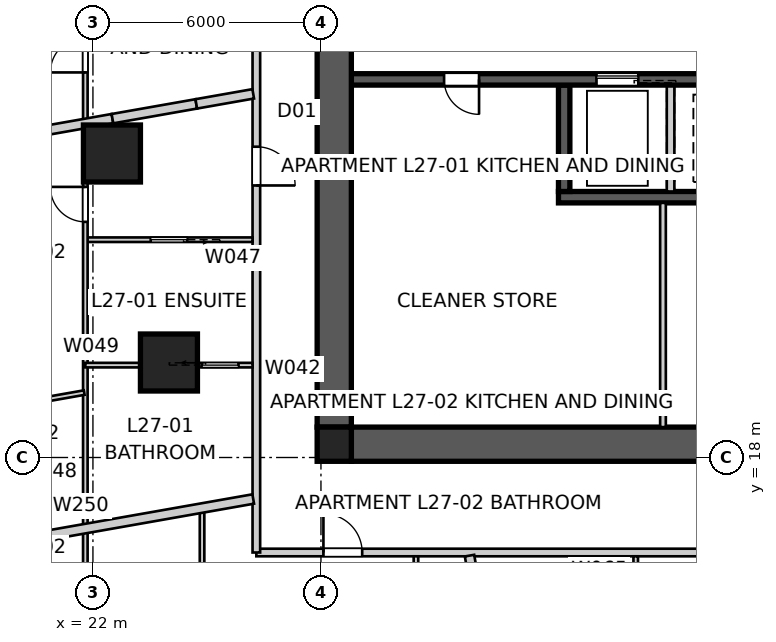
"""IFC4 building model, lengths in metres.
Left out: names, types, materials, properties, quantities, classifications, styles, units other than length and angle.
Written with IfcOpenShell. Run it as: python <this file> out.ifc"""

import sys

from ifc_helpers import new_model, si_unit, direction, frame, frame_2d, origin, origin_2d, place, context, subcontext, project, spatial, polyline, rectangle, outline, extrude, element, fill, save


model = new_model("IFC4")
c1 = context("Model", 3, precision=1e-05, world=origin(), true_north=direction((0.0, 1.0)))
c2 = subcontext(c1, "Body", "Model", "MODEL_VIEW")
j1 = project(units=[si_unit("LENGTHUNIT", "METRE"), si_unit("PLANEANGLEUNIT", "RADIAN")], contexts=[c1])
p1 = place(None, origin())
s1 = spatial("IfcSite", under=j1, at=p1, CompositionType="ELEMENT")
p2 = place(p1, origin())
s2 = spatial("IfcBuilding", under=s1, at=p2, CompositionType="ELEMENT")
p3 = place(p2, frame((0.0, 0.0, 99.8)))
s3 = spatial("IfcBuildingStorey", under=s2, at=p3, CompositionType="ELEMENT", Elevation=99.8)
p4 = place(p3, frame((51.2, 18.35, 0.0), z_axis=(0.0, 0.0, 1.0), x_axis=(-1.0, 0.0, 0.0)))
e1 = element("IfcWall", 1, at=p4, inside=s3, PredefinedType="SHEAR", context=c2, shape_type="SweptSolid", body=[
    extrude(outline(polyline([(0.0, -0.45), (22.4, -0.45), (22.4, -0.025), (22.85, -0.025), (22.85, 0.025), (22.4, 0.025), (22.4, 0.45), (0.0, 0.45), (0.0, 0.025), (-0.45, 0.025), (-0.45, -0.025), (0.0, -0.025), (0.0, -0.45)])), origin(), (0.0, 0.0, 1.0), 3.4),
])
p5 = place(p3, frame((28.35, 41.2, 0.0), z_axis=(0.0, 0.0, 1.0), x_axis=(0.0, -1.0, 0.0)))
e2 = element("IfcWall", 2, at=p5, inside=s3, PredefinedType="SHEAR", context=c2, shape_type="SweptSolid", body=[
    extrude(outline(polyline([(0.0, -0.45), (22.4, -0.45), (22.4, -0.025), (22.85, -0.025), (22.85, 0.025), (22.4, 0.025), (22.4, 0.45), (0.0, 0.45), (0.0, 0.025), (-0.45, 0.025), (-0.45, -0.025), (0.0, -0.025), (0.0, -0.45)])), origin(), (0.0, 0.0, 1.0), 3.4),
])
p6 = place(p5, frame((11.14, 0.0, 0.0)))
e3 = element("IfcOpeningElement", 3, at=p6, cuts=e2, PredefinedType="OPENING", context=c2, shape_type="SweptSolid", body=[
    extrude(rectangle(XDim=1.02, YDim=2.4, at=frame_2d((0.51, 1.2))), frame((0.0, 0.46, 0.0), z_axis=(0.0, -1.0, 0.0), x_axis=(1.0, 0.0, 0.0)), (0.0, 0.0, 1.0), 0.92),
])
p7 = place(p3, frame((51.2, 27.95, 0.0), z_axis=(0.0, 0.0, 1.0), x_axis=(-1.0, 0.0, 0.0)))
e4 = element("IfcWall", 4, at=p7, inside=s3, PredefinedType="SHEAR", context=c2, shape_type="SweptSolid", body=[
    extrude(rectangle(XDim=22.4, YDim=0.3, at=frame_2d((11.2, 0.0))), origin(), (0.0, 0.0, 1.0), 3.4),
])
p8 = place(p7, frame((19.04, 0.0, 0.0)))
e5 = element("IfcOpeningElement", 5, at=p8, cuts=e4, PredefinedType="OPENING", context=c2, shape_type="SweptSolid", body=[
    extrude(rectangle(XDim=0.92, YDim=2.1, at=frame_2d((0.46, 1.05))), frame((0.0, 0.16, 0.0), z_axis=(0.0, -1.0, 0.0), x_axis=(1.0, 0.0, 0.0)), (0.0, 0.0, 1.0), 0.32),
])
p9 = place(p7, frame((1.265, 0.0, 0.0)))
e6 = element("IfcOpeningElement", 6, at=p9, cuts=e4, PredefinedType="OPENING", context=c2, shape_type="SweptSolid", body=[
    extrude(rectangle(XDim=1.02, YDim=2.1, at=frame_2d((0.51, 1.05))), frame((0.0, 0.16, 0.0), z_axis=(0.0, -1.0, 0.0), x_axis=(1.0, 0.0, 0.0)), (0.0, 0.0, 1.0), 0.32),
])
p10 = place(p7, frame((4.015, 0.0, 0.0)))
e7 = element("IfcOpeningElement", 7, at=p10, cuts=e4, PredefinedType="OPENING", context=c2, shape_type="SweptSolid", body=[
    extrude(rectangle(XDim=0.92, YDim=2.1, at=frame_2d((0.46, 1.05))), frame((0.0, 0.16, 0.0), z_axis=(0.0, -1.0, 0.0), x_axis=(1.0, 0.0, 0.0)), (0.0, 0.0, 1.0), 0.32),
])
p11 = place(p7, frame((14.85, 0.0, 0.0)))
e8 = element("IfcOpeningElement", 8, at=p11, cuts=e4, PredefinedType="OPENING", context=c2, shape_type="SweptSolid", body=[
    extrude(rectangle(XDim=1.1, YDim=2.1, at=frame_2d((0.55, 1.05))), frame((0.0, 0.16, 0.0), z_axis=(0.0, -1.0, 0.0), x_axis=(1.0, 0.0, 0.0)), (0.0, 0.0, 1.0), 0.32),
])
p12 = place(p3, frame((45.75, 24.85, 0.0), z_axis=(0.0, 0.0, 1.0), x_axis=(-1.0, 0.0, 0.0)))
e9 = element("IfcWall", 9, at=p12, inside=s3, PredefinedType="SHEAR", context=c2, shape_type="SweptSolid", body=[
    extrude(rectangle(XDim=11.5, YDim=0.3, at=frame_2d((5.75, 0.0))), origin(), (0.0, 0.0, 1.0), 3.4),
])
p13 = place(p3, frame((37.2, 27.8, 0.0), z_axis=(0.0, 0.0, 1.0), x_axis=(0.0, -1.0, 0.0)))
e10 = element("IfcWall", 10, at=p13, inside=s3, PredefinedType="SOLIDWALL", context=c2, shape_type="SweptSolid", body=[
    extrude(rectangle(XDim=2.8, YDim=0.2, at=frame_2d((1.4, 0.0))), origin(), (0.0, 0.0, 1.0), 3.4),
])
p14 = place(p3, frame((34.4, 27.8, 0.0), z_axis=(0.0, 0.0, 1.0), x_axis=(0.0, -1.0, 0.0)))
e11 = element("IfcWall", 11, at=p14, inside=s3, PredefinedType="SHEAR", context=c2, shape_type="SweptSolid", body=[
    extrude(rectangle(XDim=2.8, YDim=0.3, at=frame_2d((1.4, 0.0))), origin(), (0.0, 0.0, 1.0), 3.4),
])
p15 = place(p3, frame((28.35, 18.35, 0.0), z_axis=(0.0, 0.0, 1.0), x_axis=(1.0, 0.0, 0.0)))
e12 = element("IfcColumn", 12, at=p15, inside=s3, PredefinedType="COLUMN", context=c2, shape_type="SweptSolid", body=[
    extrude(rectangle(XDim=0.9, YDim=0.9, at=origin_2d()), origin(), (0.0, 0.0, 1.0), 3.4),
])
for number, where, z_axis, x_axis in (
    (13, (22.5, 26.0, 0.0), (0.0, 0.0, 1.0), (1.0, 0.0, 0.0)),
    (14, (24.0, 20.5, 0.0), (0.0, 0.0, 1.0), (1.0, 0.0, 0.0)),
):
    element("IfcColumn", number, at=place(p3, frame(where, z_axis=z_axis, x_axis=x_axis)), inside=s3, PredefinedType="COLUMN", context=c2, shape_type="SweptSolid", body=[
        extrude(rectangle(XDim=1.5, YDim=1.5, at=origin_2d()), origin(), (0.0, 0.0, 1.0), 3.4),
    ])
p16 = place(p3, frame((26.3, 15.5, 0.0), z_axis=(0.0, 0.0, 1.0), x_axis=(1.0, 0.0, 0.0)))
e15 = element("IfcWall", 15, at=p16, inside=s3, PredefinedType="PARTITIONING", context=c2, shape_type="SweptSolid", body=[
    extrude(rectangle(XDim=27.4, YDim=0.2, at=frame_2d((13.7, 0.0))), origin(), (0.0, 0.0, 1.0), 3.25),
])
p17 = place(p16, frame((24.005, 0.0, 0.0)))
e16 = element("IfcOpeningElement", 16, at=p17, cuts=e15, PredefinedType="OPENING", context=c2, shape_type="SweptSolid", body=[
    extrude(rectangle(XDim=1.02, YDim=2.1, at=frame_2d((0.51, 1.05))), frame((0.0, 0.11, 0.0), z_axis=(0.0, -1.0, 0.0), x_axis=(1.0, 0.0, 0.0)), (0.0, 0.0, 1.0), 0.22),
])
p18 = place(p16, frame((1.765, 0.0, 0.0)))
e17 = element("IfcOpeningElement", 17, at=p18, cuts=e15, PredefinedType="OPENING", context=c2, shape_type="SweptSolid", body=[
    extrude(rectangle(XDim=1.02, YDim=2.1, at=frame_2d((0.51, 1.05))), frame((0.0, 0.11, 0.0), z_axis=(0.0, -1.0, 0.0), x_axis=(1.0, 0.0, 0.0)), (0.0, 0.0, 1.0), 0.22),
])
p19 = place(p3, frame((26.3, 44.5, 0.0), z_axis=(0.0, 0.0, 1.0), x_axis=(0.0, -1.0, 0.0)))
e18 = element("IfcWall", 18, at=p19, inside=s3, PredefinedType="PARTITIONING", context=c2, shape_type="SweptSolid", body=[
    extrude(rectangle(XDim=29.0, YDim=0.2, at=frame_2d((14.5, 0.0))), origin(), (0.0, 0.0, 1.0), 3.25),
])
p20 = place(p19, frame((14.257, 0.0, 0.0)))
e19 = element("IfcOpeningElement", 19, at=p20, cuts=e18, PredefinedType="OPENING", context=c2, shape_type="SweptSolid", body=[
    extrude(rectangle(XDim=1.02, YDim=2.34, at=frame_2d((0.51, 1.17))), frame((0.0, 0.11, 0.0), z_axis=(0.0, -1.0, 0.0), x_axis=(1.0, 0.0, 0.0)), (0.0, 0.0, 1.0), 0.22),
])
p21 = place(p19, frame((18.322, 0.0, 0.0)))
e20 = element("IfcOpeningElement", 20, at=p21, cuts=e18, PredefinedType="OPENING", context=c2, shape_type="SweptSolid", body=[
    extrude(rectangle(XDim=1.02, YDim=2.34, at=frame_2d((0.51, 1.17))), frame((0.0, 0.11, 0.0), z_axis=(0.0, -1.0, 0.0), x_axis=(1.0, 0.0, 0.0)), (0.0, 0.0, 1.0), 0.22),
])
p22 = place(p19, frame((3.963, 0.0, 0.0)))
e21 = element("IfcOpeningElement", 21, at=p22, cuts=e18, PredefinedType="OPENING", context=c2, shape_type="SweptSolid", body=[
    extrude(rectangle(XDim=1.02, YDim=2.34, at=frame_2d((0.51, 1.17))), frame((0.0, 0.11, 0.0), z_axis=(0.0, -1.0, 0.0), x_axis=(1.0, 0.0, 0.0)), (0.0, 0.0, 1.0), 0.22),
])
p23 = place(p3, frame((34.001, 3.556, 0.0), z_axis=(0.0, 0.0, 1.0), x_axis=(-0.173654664517, 0.984806609184, 0.0)))
e22 = element("IfcWall", 22, at=p23, inside=s3, PredefinedType="PARTITIONING", context=c2, shape_type="SweptSolid", body=[
    extrude(rectangle(XDim=12.044, YDim=0.25, at=frame_2d((6.022, 0.0))), origin(), (0.0, 0.0, 1.0), 3.25),
])
p24 = place(p3, frame((17.203, 15.318, 0.0), z_axis=(0.0, 0.0, 1.0), x_axis=(0.984810933893, 0.173630137029, 0.0)))
e23 = element("IfcWall", 23, at=p24, inside=s3, PredefinedType="PARTITIONING", context=c2, shape_type="SweptSolid", body=[
    extrude(rectangle(XDim=9.154, YDim=0.25, at=frame_2d((4.577, 0.0))), origin(), (0.0, 0.0, 1.0), 3.25),
])
p25 = place(p3, frame((15.38, 25.659, 0.0), z_axis=(0.0, 0.0, 1.0), x_axis=(0.984802553948, 0.173677660443, 0.0)))
e24 = element("IfcWall", 24, at=p25, inside=s3, PredefinedType="PARTITIONING", context=c2, shape_type="SweptSolid", body=[
    extrude(rectangle(XDim=7.244, YDim=0.25, at=frame_2d((3.622, 0.0))), origin(), (0.0, 0.0, 1.0), 3.25),
])
p26 = place(p3, frame((22.513, 26.917, 0.0), z_axis=(0.0, 0.0, 1.0), x_axis=(0.984809882944, 0.17363609779, 0.0)))
e25 = element("IfcWall", 25, at=p26, inside=s3, PredefinedType="PARTITIONING", context=c2, shape_type="SweptSolid", body=[
    extrude(rectangle(XDim=2.24, YDim=0.25, at=frame_2d((1.12, 0.0))), origin(), (0.0, 0.0, 1.0), 2.795),
])
p27 = place(p3, frame((24.719, 27.306, 0.0), z_axis=(0.0, 0.0, 1.0), x_axis=(0.984815846312, 0.173602272028, 0.0)))
e26 = element("IfcWall", 26, at=p27, inside=s3, PredefinedType="PARTITIONING", context=c2, shape_type="SweptSolid", body=[
    extrude(rectangle(XDim=1.522, YDim=0.25, at=frame_2d((0.761, 0.0))), origin(), (0.0, 0.0, 1.0), 3.25),
])
p28 = place(p3, frame((37.0, 18.8, 0.0), z_axis=(0.0, 0.0, 1.0), x_axis=(0.0, 1.0, 0.0)))
e27 = element("IfcWall", 27, at=p28, inside=s3, PredefinedType="SOLIDWALL", context=c2, shape_type="SweptSolid", body=[
    extrude(rectangle(XDim=5.9, YDim=0.15, at=frame_2d((2.95, 0.0))), origin(), (0.0, 0.0, 1.0), 3.25),
])
p29 = place(p3, frame((26.2, 23.731, 0.0), z_axis=(0.0, 0.0, 1.0), x_axis=(-1.0, 0.0, 0.0)))
e28 = element("IfcWall", 28, at=p29, inside=s3, PredefinedType="PARTITIONING", context=c2, shape_type="SweptSolid", body=[
    extrude(rectangle(XDim=4.4, YDim=0.12, at=frame_2d((2.2, 0.0))), origin(), (0.0, 0.0, 1.0), 3.25),
])
p30 = place(p29, frame((1.72, 0.0, 0.0)))
e29 = element("IfcOpeningElement", 29, at=p30, cuts=e28, PredefinedType="OPENING", context=c2, shape_type="SweptSolid", body=[
    extrude(rectangle(XDim=0.96, YDim=2.1, at=frame_2d((0.48, 1.05))), frame((0.0, 0.07, 0.0), z_axis=(0.0, -1.0, 0.0), x_axis=(1.0, 0.0, 0.0)), (0.0, 0.0, 1.0), 0.14),
])
p31 = place(p3, frame((21.8, 11.8, 0.0), z_axis=(0.0, 0.0, 1.0), x_axis=(0.0, 1.0, 0.0)))
e30 = element("IfcWall", 30, at=p31, inside=s3, PredefinedType="PARTITIONING", context=c2, shape_type="SweptSolid", body=[
    extrude(rectangle(XDim=25.653, YDim=0.12, at=frame_2d((12.826, 0.0))), origin(), (0.0, 0.0, 1.0), 3.25),
])
p32 = place(p31, frame((16.333, 0.0, 0.0)))
e31 = element("IfcOpeningElement", 31, at=p32, cuts=e30, PredefinedType="OPENING", context=c2, shape_type="SweptSolid", body=[
    extrude(rectangle(XDim=0.92, YDim=2.34, at=frame_2d((0.46, 1.17))), frame((0.0, 0.07, 0.0), z_axis=(0.0, -1.0, 0.0), x_axis=(1.0, 0.0, 0.0)), (0.0, 0.0, 1.0), 0.14),
])
p33 = place(p31, frame((18.821, 0.0, 0.0)))
e32 = element("IfcOpeningElement", 32, at=p33, cuts=e30, PredefinedType="OPENING", context=c2, shape_type="SweptSolid", body=[
    extrude(rectangle(XDim=0.92, YDim=2.34, at=frame_2d((0.46, 1.17))), frame((0.0, 0.07, 0.0), z_axis=(0.0, -1.0, 0.0), x_axis=(1.0, 0.0, 0.0)), (0.0, 0.0, 1.0), 0.14),
])
p34 = place(p31, frame((12.401, 0.0, 0.0)))
e33 = element("IfcOpeningElement", 33, at=p34, cuts=e30, PredefinedType="OPENING", context=c2, shape_type="SweptSolid", body=[
    extrude(rectangle(XDim=0.92, YDim=2.34, at=frame_2d((0.46, 1.17))), frame((0.0, 0.07, 0.0), z_axis=(0.0, -1.0, 0.0), x_axis=(1.0, 0.0, 0.0)), (0.0, 0.0, 1.0), 0.14),
])
p35 = place(p31, frame((2.066, 0.0, 0.0)))
e34 = element("IfcOpeningElement", 34, at=p35, cuts=e30, PredefinedType="OPENING", context=c2, shape_type="SweptSolid", body=[
    extrude(rectangle(XDim=0.92, YDim=2.34, at=frame_2d((0.46, 1.17))), frame((0.0, 0.07, 0.0), z_axis=(0.0, -1.0, 0.0), x_axis=(1.0, 0.0, 0.0)), (0.0, 0.0, 1.0), 0.14),
])
p36 = place(p31, frame((23.651, 0.0, 0.0)))
e35 = element("IfcOpeningElement", 35, at=p36, cuts=e30, PredefinedType="OPENING", context=c2, shape_type="SweptSolid", body=[
    extrude(rectangle(XDim=0.96, YDim=2.1, at=frame_2d((0.48, 1.05))), frame((0.0, 0.07, 0.0), z_axis=(0.0, -1.0, 0.0), x_axis=(1.0, 0.0, 0.0)), (0.0, 0.0, 1.0), 0.14),
])
p37 = place(p3, frame((21.8, 20.431, 0.0), z_axis=(0.0, 0.0, 1.0), x_axis=(1.0, 0.0, 0.0)))
e36 = element("IfcWall", 36, at=p37, inside=s3, PredefinedType="PARTITIONING", context=c2, shape_type="SweptSolid", body=[
    extrude(rectangle(XDim=4.4, YDim=0.12, at=frame_2d((2.2, 0.0))), origin(), (0.0, 0.0, 1.0), 3.25),
])
p38 = place(p37, frame((3.07, 0.0, 0.0)))
e37 = element("IfcOpeningElement", 37, at=p38, cuts=e36, PredefinedType="OPENING", context=c2, shape_type="SweptSolid", body=[
    extrude(rectangle(XDim=0.96, YDim=2.1, at=frame_2d((0.48, 1.05))), frame((0.0, 0.07, 0.0), z_axis=(0.0, -1.0, 0.0), x_axis=(1.0, 0.0, 0.0)), (0.0, 0.0, 1.0), 0.14),
])
p39 = place(p3, frame((21.77, 19.708, 0.0), z_axis=(0.0, 0.0, 1.0), x_axis=(-0.984812268581, -0.173622566657, 0.0)))
e38 = element("IfcWall", 38, at=p39, inside=s3, PredefinedType="PARTITIONING", context=c2, shape_type="SweptSolid", body=[
    extrude(rectangle(XDim=5.22, YDim=0.12, at=frame_2d((2.61, 0.0))), origin(), (0.0, 0.0, 1.0), 3.25),
])
p40 = place(p39, frame((2.155, 0.0, 0.0)))
e39 = element("IfcOpeningElement", 39, at=p40, cuts=e38, PredefinedType="OPENING", context=c2, shape_type="SweptSolid", body=[
    extrude(rectangle(XDim=0.92, YDim=2.34, at=frame_2d((0.46, 1.17))), frame((0.0, 0.07, 0.0), z_axis=(0.0, -1.0, 0.0), x_axis=(1.0, 0.0, 0.0)), (0.0, 0.0, 1.0), 0.14),
])
p41 = place(p3, frame((30.5, 11.8, 0.0), z_axis=(0.0, 0.0, 1.0), x_axis=(0.0, 1.0, 0.0)))
e40 = element("IfcWall", 40, at=p41, inside=s3, PredefinedType="PARTITIONING", context=c2, shape_type="SweptSolid", body=[
    extrude(rectangle(XDim=3.6, YDim=0.12, at=frame_2d((1.8, 0.0))), origin(), (0.0, 0.0, 1.0), 3.25),
])
p42 = place(p41, frame((0.42, 0.0, 0.0)))
e41 = element("IfcOpeningElement", 41, at=p42, cuts=e40, PredefinedType="OPENING", context=c2, shape_type="SweptSolid", body=[
    extrude(rectangle(XDim=0.96, YDim=2.1, at=frame_2d((0.48, 1.05))), frame((0.0, 0.07, 0.0), z_axis=(0.0, -1.0, 0.0), x_axis=(1.0, 0.0, 0.0)), (0.0, 0.0, 1.0), 0.14),
])
p43 = place(p3, frame((24.871, 11.8, 0.0), z_axis=(0.0, 0.0, 1.0), x_axis=(0.0, 1.0, 0.0)))
e42 = element("IfcWall", 42, at=p43, inside=s3, PredefinedType="PARTITIONING", context=c2, shape_type="SweptSolid", body=[
    extrude(rectangle(XDim=4.87, YDim=0.12, at=frame_2d((2.435, 0.0))), origin(), (0.0, 0.0, 1.0), 3.25),
])
p44 = place(p43, frame((1.975, 0.0, 0.0)))
e43 = element("IfcOpeningElement", 43, at=p44, cuts=e42, PredefinedType="OPENING", context=c2, shape_type="SweptSolid", body=[
    extrude(rectangle(XDim=0.92, YDim=2.34, at=frame_2d((0.46, 1.17))), frame((0.0, 0.07, 0.0), z_axis=(0.0, -1.0, 0.0), x_axis=(1.0, 0.0, 0.0)), (0.0, 0.0, 1.0), 0.14),
])
p45 = place(p3, frame((36.283, 15.4, 0.0), z_axis=(0.0, 0.0, 1.0), x_axis=(0.0, -1.0, 0.0)))
e44 = element("IfcWall", 44, at=p45, inside=s3, PredefinedType="PARTITIONING", context=c2, shape_type="SweptSolid", body=[
    extrude(rectangle(XDim=3.6, YDim=0.12, at=frame_2d((1.8, 0.0))), origin(), (0.0, 0.0, 1.0), 3.25),
])
p46 = place(p45, frame((1.17, 0.0, 0.0)))
e45 = element("IfcOpeningElement", 45, at=p46, cuts=e44, PredefinedType="OPENING", context=c2, shape_type="SweptSolid", body=[
    extrude(rectangle(XDim=0.96, YDim=2.1, at=frame_2d((0.48, 1.05))), frame((0.0, 0.07, 0.0), z_axis=(0.0, -1.0, 0.0), x_axis=(1.0, 0.0, 0.0)), (0.0, 0.0, 1.0), 0.14),
])
p47 = place(p8, origin())
e46 = element("IfcDoor", 46, at=p47, inside=s3, OperationType="SINGLE_SWING_LEFT", PredefinedType="DOOR", context=c2, shape_type="SweptSolid", body=[
    extrude(rectangle(XDim=0.92, YDim=2.1, at=frame_2d((0.46, 1.05))), frame((0.0, 0.025, 0.0), z_axis=(0.0, -1.0, 0.0), x_axis=(1.0, 0.0, 0.0)), (0.0, 0.0, 1.0), 0.05),
])
fill(e5, e46)
p48 = place(p21, origin())
e47 = element("IfcDoor", 47, at=p48, inside=s3, OperationType="SINGLE_SWING_RIGHT", PredefinedType="DOOR", context=c2, shape_type="SweptSolid", body=[
    extrude(rectangle(XDim=1.02, YDim=2.34, at=frame_2d((0.51, 1.17))), frame((0.0, 0.025, 0.0), z_axis=(0.0, -1.0, 0.0), x_axis=(1.0, 0.0, 0.0)), (0.0, 0.0, 1.0), 0.05),
])
fill(e20, e47)
p49 = place(p18, origin())
e48 = element("IfcDoor", 48, at=p49, inside=s3, OperationType="SINGLE_SWING_LEFT", PredefinedType="DOOR", context=c2, shape_type="SweptSolid", body=[
    extrude(rectangle(XDim=1.02, YDim=2.1, at=frame_2d((0.51, 1.05))), frame((0.0, 0.025, 0.0), z_axis=(0.0, -1.0, 0.0), x_axis=(1.0, 0.0, 0.0)), (0.0, 0.0, 1.0), 0.05),
])
fill(e17, e48)
p50 = place(p32, origin())
e49 = element("IfcDoor", 49, at=p50, inside=s3, OperationType="SINGLE_SWING_LEFT", PredefinedType="DOOR", context=c2, shape_type="SweptSolid", body=[
    extrude(rectangle(XDim=0.92, YDim=2.34, at=frame_2d((0.46, 1.17))), frame((0.0, 0.025, 0.0), z_axis=(0.0, -1.0, 0.0), x_axis=(1.0, 0.0, 0.0)), (0.0, 0.0, 1.0), 0.05),
])
fill(e31, e49)
p51 = place(p30, origin())
e50 = element("IfcDoor", 50, at=p51, inside=s3, OperationType="SLIDING_TO_LEFT", PredefinedType="DOOR", context=c2, shape_type="SweptSolid", body=[
    extrude(rectangle(XDim=0.96, YDim=2.1, at=frame_2d((0.48, 1.05))), frame((0.0, 0.025, 0.0), z_axis=(0.0, -1.0, 0.0), x_axis=(1.0, 0.0, 0.0)), (0.0, 0.0, 1.0), 0.05),
])
fill(e29, e50)
p52 = place(p34, origin())
e51 = element("IfcDoor", 51, at=p52, inside=s3, OperationType="SINGLE_SWING_RIGHT", PredefinedType="DOOR", context=c2, shape_type="SweptSolid", body=[
    extrude(rectangle(XDim=0.92, YDim=2.34, at=frame_2d((0.46, 1.17))), frame((0.0, 0.025, 0.0), z_axis=(0.0, -1.0, 0.0), x_axis=(1.0, 0.0, 0.0)), (0.0, 0.0, 1.0), 0.05),
])
fill(e33, e51)
p53 = place(p38, origin())
e52 = element("IfcDoor", 52, at=p53, inside=s3, OperationType="SLIDING_TO_LEFT", PredefinedType="DOOR", context=c2, shape_type="SweptSolid", body=[
    extrude(rectangle(XDim=0.96, YDim=2.1, at=frame_2d((0.48, 1.05))), frame((0.0, 0.025, 0.0), z_axis=(0.0, -1.0, 0.0), x_axis=(1.0, 0.0, 0.0)), (0.0, 0.0, 1.0), 0.05),
])
fill(e37, e52)
p54 = place(p11, origin())
e53 = element("IfcDoor", 53, at=p54, inside=s3, OperationType="SLIDING_TO_LEFT", PredefinedType="DOOR", context=c2, shape_type="SweptSolid", body=[
    extrude(rectangle(XDim=1.1, YDim=2.1, at=frame_2d((0.55, 1.05))), frame((0.0, 0.025, 0.0), z_axis=(0.0, -1.0, 0.0), x_axis=(1.0, 0.0, 0.0)), (0.0, 0.0, 1.0), 0.05),
])
fill(e8, e53)
save(model, sys.argv[1])
